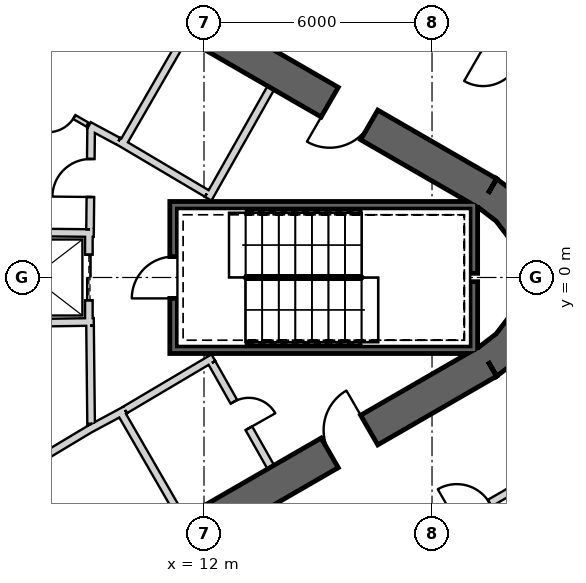
"""IFC4 building model, lengths in metres.
Left out: names, types, materials, properties, quantities, classifications, styles, units other than length and angle.
Written with IfcOpenShell. Run it as: python <this file> out.ifc"""

import sys

from ifc_helpers import new_model, si_unit, direction, frame, frame_2d, origin, place, context, subcontext, project, spatial, polyline, rectangle, outline, extrude, element, fill, save


model = new_model("IFC4")
c1 = context("Model", 3, precision=1e-05, world=origin(), true_north=direction((0.0, 1.0)))
c2 = subcontext(c1, "Body", "Model", "MODEL_VIEW")
j1 = project(units=[si_unit("LENGTHUNIT", "METRE"), si_unit("PLANEANGLEUNIT", "RADIAN")], contexts=[c1])
p1 = place(None, origin())
s1 = spatial("IfcSite", under=j1, at=p1, CompositionType="ELEMENT")
p2 = place(p1, origin())
s2 = spatial("IfcBuilding", under=s1, at=p2, CompositionType="ELEMENT")
p3 = place(p2, frame((0.0, 0.0, 292.7)))
s3 = spatial("IfcBuildingStorey", under=s2, at=p3, CompositionType="ELEMENT", Elevation=292.7)
p4 = place(p3, frame((19.475, 2.208, 0.0), z_axis=(0.0, 0.0, 1.0), x_axis=(-0.866028369851, 0.499994862586, 0.0)))
e1 = element("IfcWall", 1, at=p4, inside=s3, PredefinedType="SHEAR", context=c2, shape_type="SweptSolid", body=[
    extrude(rectangle(XDim=31.523, YDim=0.9, at=frame_2d((15.762, 0.0))), origin(), (0.0, 0.0, 1.0), 6.0),
])
p5 = place(p4, frame((3.612, 0.0, 0.0)))
e2 = element("IfcOpeningElement", 2, at=p5, cuts=e1, PredefinedType="OPENING", context=c2, shape_type="SweptSolid", body=[
    extrude(rectangle(XDim=1.2, YDim=2.4, at=frame_2d((0.6, 1.2))), frame((0.0, 0.46, 0.0), z_axis=(0.0, -1.0, 0.0), x_axis=(1.0, 0.0, 0.0)), (0.0, 0.0, 1.0), 0.92),
])
p6 = place(p4, frame((26.712, 0.0, 0.0)))
e3 = element("IfcOpeningElement", 3, at=p6, cuts=e1, PredefinedType="OPENING", context=c2, shape_type="SweptSolid", body=[
    extrude(rectangle(XDim=1.2, YDim=2.4, at=frame_2d((0.6, 1.2))), frame((0.0, 0.46, 0.0), z_axis=(0.0, -1.0, 0.0), x_axis=(1.0, 0.0, 0.0)), (0.0, 0.0, 1.0), 0.92),
])
p7 = place(p3, frame((-7.825, -17.97, 0.0), z_axis=(0.0, 0.0, 1.0), x_axis=(0.866028369851, 0.499994862586, 0.0)))
e4 = element("IfcWall", 4, at=p7, inside=s3, PredefinedType="SHEAR", context=c2, shape_type="SweptSolid", body=[
    extrude(rectangle(XDim=31.523, YDim=0.9, at=frame_2d((15.762, 0.0))), origin(), (0.0, 0.0, 1.0), 6.0),
])
p8 = place(p7, frame((26.712, 0.0, 0.0)))
e5 = element("IfcOpeningElement", 5, at=p8, cuts=e4, PredefinedType="OPENING", context=c2, shape_type="SweptSolid", body=[
    extrude(rectangle(XDim=1.2, YDim=2.4, at=frame_2d((0.6, 1.2))), frame((0.0, 0.46, 0.0), z_axis=(0.0, -1.0, 0.0), x_axis=(1.0, 0.0, 0.0)), (0.0, 0.0, 1.0), 0.92),
])
p9 = place(p7, frame((3.612, 0.0, 0.0)))
e6 = element("IfcOpeningElement", 6, at=p9, cuts=e4, PredefinedType="OPENING", context=c2, shape_type="SweptSolid", body=[
    extrude(rectangle(XDim=1.2, YDim=2.4, at=frame_2d((0.6, 1.2))), frame((0.0, 0.46, 0.0), z_axis=(0.0, -1.0, 0.0), x_axis=(1.0, 0.0, 0.0)), (0.0, 0.0, 1.0), 0.92),
])
p10 = place(p3, origin())
e7 = element("IfcWall", 7, at=p10, inside=s3, PredefinedType="SHEAR", context=c2, shape_type="SweptSolid", body=[
    extrude(outline(polyline([(19.7, -2.598), (20.321, -2.121), (20.798, -1.5), (21.098, -0.777), (21.2, 0.0), (21.098, 0.777), (20.798, 1.5), (20.321, 2.121), (19.7, 2.598), (19.25, 1.819), (19.685, 1.485), (20.019, 1.05), (20.229, 0.543), (20.3, 0.0), (20.229, -0.543), (20.019, -1.05), (19.685, -1.485), (19.25, -1.819), (19.7, -2.598)])), origin(), (0.0, 0.0, 1.0), 6.0),
])
p11 = place(p3, frame((9.847, 3.495, 0.0), z_axis=(0.0, 0.0, 1.0), x_axis=(0.499984717929, 0.866034226713, 0.0)))
e8 = element("IfcWall", 8, at=p11, inside=s3, PredefinedType="PLUMBINGWALL", context=c2, shape_type="SweptSolid", body=[
    extrude(rectangle(XDim=3.25, YDim=0.2, at=frame_2d((1.625, 0.0))), origin(), (0.0, 0.0, 1.0), 5.7),
])
p12 = place(p3, frame((12.11, 2.073, 0.0), z_axis=(0.0, 0.0, 1.0), x_axis=(0.49196600604, 0.870614408852, 0.0)))
e9 = element("IfcWall", 9, at=p12, inside=s3, PredefinedType="PLUMBINGWALL", context=c2, shape_type="SweptSolid", body=[
    extrude(rectangle(XDim=3.35, YDim=0.2, at=frame_2d((1.675, 0.0))), origin(), (0.0, 0.0, 1.0), 5.7),
])
p13 = place(p3, frame((12.073, 2.211, 0.0), z_axis=(0.0, 0.0, 1.0), x_axis=(-0.860414880418, 0.509594185166, 0.0)))
e10 = element("IfcWall", 10, at=p13, inside=s3, PredefinedType="PLUMBINGWALL", context=c2, shape_type="SweptSolid", body=[
    extrude(rectangle(XDim=2.7, YDim=0.2, at=frame_2d((1.35, 0.0))), origin(), (0.0, 0.0, 1.0), 5.7),
])
p14 = place(p3, frame((9.795, -3.525, 0.0), z_axis=(0.0, 0.0, 1.0), x_axis=(0.499984717929, -0.866034226713, 0.0)))
e11 = element("IfcWall", 11, at=p14, inside=s3, PredefinedType="PLUMBINGWALL", context=c2, shape_type="SweptSolid", body=[
    extrude(rectangle(XDim=3.25, YDim=0.2, at=frame_2d((1.625, 0.0))), origin(), (0.0, 0.0, 1.0), 5.7),
])
p15 = place(p3, frame((8.974, -3.999, 0.0), z_axis=(0.0, 0.0, 1.0), x_axis=(0.880907015104, 0.473289373154, 0.0)))
e12 = element("IfcWall", 12, at=p15, inside=s3, PredefinedType="PLUMBINGWALL", context=c2, shape_type="SweptSolid", body=[
    extrude(rectangle(XDim=1.078, YDim=0.2, at=frame_2d((0.539, 0.0))), origin(), (0.0, 0.0, 1.0), 5.7),
])
p16 = place(p3, frame((7.497, -4.886, 0.0), z_axis=(0.0, 0.0, 1.0), x_axis=(0.857516281273, 0.51445682749, 0.0)))
e13 = element("IfcWall", 13, at=p16, inside=s3, PredefinedType="PLUMBINGWALL", context=c2, shape_type="SweptSolid", body=[
    extrude(rectangle(XDim=1.845, YDim=0.2, at=frame_2d((0.922, 0.0))), origin(), (0.0, 0.0, 1.0), 5.7),
])
p17 = place(p3, frame((19.2, 1.9, -0.35), z_axis=(0.0, 0.0, 1.0), x_axis=(-1.0, 0.0, 0.0)))
e14 = element("IfcWall", 14, at=p17, inside=s3, PredefinedType="SHEAR", context=c2, shape_type="SweptSolid", body=[
    extrude(rectangle(XDim=8.1, YDim=0.2, at=frame_2d((4.05, 0.0))), origin(), (0.0, 0.0, 1.0), 6.05),
])
p18 = place(p3, frame((19.1, -2.0, -0.35), z_axis=(0.0, 0.0, 1.0), x_axis=(0.0, 1.0, 0.0)))
e15 = element("IfcWall", 15, at=p18, inside=s3, PredefinedType="SHEAR", context=c2, shape_type="SweptSolid", body=[
    extrude(rectangle(XDim=1.89, YDim=0.2, at=frame_2d((0.945, 0.0))), origin(), (0.0, 0.0, 1.0), 6.05),
])
p19 = place(p3, frame((19.1, 0.11, -0.35), z_axis=(0.0, 0.0, 1.0), x_axis=(0.0, 1.0, 0.0)))
e16 = element("IfcWall", 16, at=p19, inside=s3, PredefinedType="SHEAR", context=c2, shape_type="SweptSolid", body=[
    extrude(rectangle(XDim=1.69, YDim=0.2, at=frame_2d((0.845, 0.0))), origin(), (0.0, 0.0, 1.0), 6.05),
])
p20 = place(p3, frame((11.1, -1.9, -0.35), z_axis=(0.0, 0.0, 1.0), x_axis=(1.0, 0.0, 0.0)))
e17 = element("IfcWall", 17, at=p20, inside=s3, PredefinedType="SHEAR", context=c2, shape_type="SweptSolid", body=[
    extrude(rectangle(XDim=7.9, YDim=0.2, at=frame_2d((3.95, 0.0))), origin(), (0.0, 0.0, 1.0), 6.05),
])
p21 = place(p3, frame((11.2, -1.8, -0.35), z_axis=(0.0, 0.0, 1.0), x_axis=(0.0, 1.0, 0.0)))
e18 = element("IfcWall", 18, at=p21, inside=s3, PredefinedType="SHEAR", context=c2, shape_type="SweptSolid", body=[
    extrude(rectangle(XDim=3.6, YDim=0.2, at=frame_2d((1.8, 0.0))), origin(), (0.0, 0.0, 1.0), 6.05),
])
p22 = place(p21, frame((1.25, 0.0, 0.35)))
e19 = element("IfcOpeningElement", 19, at=p22, cuts=e18, PredefinedType="OPENING", context=c2, shape_type="SweptSolid", body=[
    extrude(rectangle(XDim=1.1, YDim=2.1, at=frame_2d((0.55, 1.05))), frame((0.0, 0.11, 0.0), z_axis=(0.0, -1.0, 0.0), x_axis=(1.0, 0.0, 0.0)), (0.0, 0.0, 1.0), 0.22),
])
p23 = place(p3, frame((8.97, 1.2, 0.0), z_axis=(0.0, 0.0, 1.0), x_axis=(0.0, -1.0, 0.0)))
e20 = element("IfcWall", 20, at=p23, inside=s3, PredefinedType="PLUMBINGWALL", context=c2, shape_type="SweptSolid", body=[
    extrude(rectangle(XDim=2.4, YDim=0.2, at=frame_2d((1.2, 0.0))), origin(), (0.0, 0.0, 1.0), 5.7),
])
p24 = place(p23, frame((0.6, 0.0, 0.0)))
e21 = element("IfcOpeningElement", 21, at=p24, cuts=e20, PredefinedType="OPENING", context=c2, shape_type="SweptSolid", body=[
    extrude(rectangle(XDim=1.2, YDim=2.4, at=frame_2d((0.6, 1.2))), frame((0.0, 0.11, 0.0), z_axis=(0.0, -1.0, 0.0), x_axis=(1.0, 0.0, 0.0)), (0.0, 0.0, 1.0), 0.22),
])
p25 = place(p3, frame((9.1, -1.168, 0.0), z_axis=(0.0, 0.0, 1.0), x_axis=(-0.999896137355, -0.014412303875, 0.0)))
e22 = element("IfcWall", 22, at=p25, inside=s3, PredefinedType="PLUMBINGWALL", context=c2, shape_type="SweptSolid", body=[
    extrude(rectangle(XDim=2.151, YDim=0.2, at=frame_2d((1.076, 0.0))), origin(), (0.0, 0.0, 1.0), 5.7),
])
p26 = place(p3, frame((9.1, 1.169, 0.0), z_axis=(0.0, 0.0, 1.0), x_axis=(-0.99994990606, 0.010009264196, 0.0)))
e23 = element("IfcWall", 23, at=p26, inside=s3, PredefinedType="PLUMBINGWALL", context=c2, shape_type="SweptSolid", body=[
    extrude(rectangle(XDim=3.0, YDim=0.2, at=frame_2d((1.5, 0.0))), origin(), (0.0, 0.0, 1.0), 5.7),
])
p27 = place(p3, frame((8.974, 3.999, 0.0), z_axis=(0.0, 0.0, 1.0), x_axis=(0.880917147855, -0.473270513147, 0.0)))
e24 = element("IfcWall", 24, at=p27, inside=s3, PredefinedType="PARTITIONING", context=c2, shape_type="SweptSolid", body=[
    extrude(rectangle(XDim=0.878, YDim=0.2, at=frame_2d((0.439, 0.0))), origin(), (0.0, 0.0, 1.0), 5.7),
])
p28 = place(p3, frame((7.55, 4.821, 0.0), z_axis=(0.0, 0.0, 1.0), x_axis=(0.866019818373, -0.500009674092, 0.0)))
e25 = element("IfcWall", 25, at=p28, inside=s3, PredefinedType="PARTITIONING", context=c2, shape_type="SweptSolid", body=[
    extrude(rectangle(XDim=1.594, YDim=0.12, at=frame_2d((0.797, 0.0))), origin(), (0.0, 0.0, 1.0), 5.7),
])
p29 = place(p28, frame((0.397, 0.0, 0.0)))
e26 = element("IfcOpeningElement", 26, at=p29, cuts=e25, PredefinedType="OPENING", context=c2, shape_type="SweptSolid", body=[
    extrude(rectangle(XDim=0.8, YDim=2.1, at=frame_2d((0.4, 1.05))), frame((0.0, 0.07, 0.0), z_axis=(0.0, -1.0, 0.0), x_axis=(1.0, 0.0, 0.0)), (0.0, 0.0, 1.0), 0.14),
])
p30 = place(p3, frame((12.245, -2.109, 0.0), z_axis=(0.0, 0.0, 1.0), x_axis=(-0.860414880418, -0.509594185166, 0.0)))
e27 = element("IfcWall", 27, at=p30, inside=s3, PredefinedType="PARTITIONING", context=c2, shape_type="SweptSolid", body=[
    extrude(rectangle(XDim=2.7, YDim=0.2, at=frame_2d((1.35, 0.0))), origin(), (0.0, 0.0, 1.0), 5.7),
])
p31 = place(p3, frame((13.758, -4.99, 0.0), z_axis=(0.0, 0.0, 1.0), x_axis=(-0.491993409184, 0.87059892334, 0.0)))
e28 = element("IfcWall", 28, at=p31, inside=s3, PredefinedType="PARTITIONING", context=c2, shape_type="SweptSolid", body=[
    extrude(rectangle(XDim=3.15, YDim=0.2, at=frame_2d((1.575, 0.0))), origin(), (0.0, 0.0, 1.0), 5.7),
])
p32 = place(p31, frame((1.175, 0.0, 0.0)))
e29 = element("IfcOpeningElement", 29, at=p32, cuts=e28, PredefinedType="OPENING", context=c2, shape_type="SweptSolid", body=[
    extrude(rectangle(XDim=0.8, YDim=2.1, at=frame_2d((0.4, 1.05))), frame((0.0, 0.11, 0.0), z_axis=(0.0, -1.0, 0.0), x_axis=(1.0, 0.0, 0.0)), (0.0, 0.0, 1.0), 0.22),
])
p33 = place(p3, frame((9.029, -3.851, 0.0), z_axis=(0.0, 0.0, 1.0), x_axis=(-0.010784614026, 0.999941844359, 0.0)))
e30 = element("IfcWall", 30, at=p33, inside=s3, PredefinedType="PARTITIONING", context=c2, shape_type="SweptSolid", body=[
    extrude(rectangle(XDim=2.581, YDim=0.2, at=frame_2d((1.291, 0.0))), origin(), (0.0, 0.0, 1.0), 5.7),
])
p34 = place(p3, frame((9.001, 1.27, 0.0), z_axis=(0.0, 0.0, 1.0), x_axis=(0.010723968736, 0.999942496594, 0.0)))
e31 = element("IfcWall", 31, at=p34, inside=s3, PredefinedType="PARTITIONING", context=c2, shape_type="SweptSolid", body=[
    extrude(rectangle(XDim=2.709, YDim=0.2, at=frame_2d((1.354, 0.0))), origin(), (0.0, 0.0, 1.0), 5.7),
])
p35 = place(p34, frame((0.848, 0.0, 0.0)))
e32 = element("IfcOpeningElement", 32, at=p35, cuts=e31, PredefinedType="OPENING", context=c2, shape_type="SweptSolid", body=[
    extrude(rectangle(XDim=1.0, YDim=2.1, at=frame_2d((0.5, 1.05))), frame((0.0, 0.11, 0.0), z_axis=(0.0, -1.0, 0.0), x_axis=(1.0, 0.0, 0.0)), (0.0, 0.0, 1.0), 0.22),
])
p36 = place(p3, frame((21.596, 4.736, 0.0), z_axis=(0.0, 0.0, 1.0), x_axis=(-0.86599454633, 0.50005344287, 0.0)))
e33 = element("IfcWall", 33, at=p36, inside=s3, PredefinedType="PARTITIONING", context=c2, shape_type="SweptSolid", body=[
    extrude(rectangle(XDim=4.065, YDim=0.2, at=frame_2d((2.032, 0.0))), origin(), (0.0, 0.0, 1.0), 4.98),
])
p37 = place(p36, frame((1.6, 0.0, 0.0)))
e34 = element("IfcOpeningElement", 34, at=p37, cuts=e33, PredefinedType="OPENING", context=c2, shape_type="SweptSolid", body=[
    extrude(rectangle(XDim=1.0, YDim=2.1, at=frame_2d((0.5, 1.05))), frame((0.0, 0.11, 0.0), z_axis=(0.0, -1.0, 0.0), x_axis=(1.0, 0.0, 0.0)), (0.0, 0.0, 1.0), 0.22),
])
p38 = place(p3, frame((16.876, -7.462, 0.0), z_axis=(0.0, 0.0, 1.0), x_axis=(0.866025553686, 0.499999740363, 0.0)))
e35 = element("IfcWall", 35, at=p38, inside=s3, PredefinedType="PARTITIONING", context=c2, shape_type="SweptSolid", body=[
    extrude(rectangle(XDim=5.183, YDim=0.2, at=frame_2d((2.591, 0.0))), origin(), (0.0, 0.0, 1.0), 4.98),
])
p39 = place(p38, frame((2.05, 0.0, 0.0)))
e36 = element("IfcOpeningElement", 36, at=p39, cuts=e35, PredefinedType="OPENING", context=c2, shape_type="SweptSolid", body=[
    extrude(rectangle(XDim=1.0, YDim=2.1, at=frame_2d((0.5, 1.05))), frame((0.0, 0.11, 0.0), z_axis=(0.0, -1.0, 0.0), x_axis=(1.0, 0.0, 0.0)), (0.0, 0.0, 1.0), 0.22),
])
p40 = place(p22, origin())
e37 = element("IfcDoor", 37, at=p40, inside=s3, OperationType="SINGLE_SWING_LEFT", PredefinedType="USERDEFINED", context=c2, shape_type="SweptSolid", body=[
    extrude(rectangle(XDim=1.1, YDim=2.1, at=frame_2d((0.55, 1.05))), frame((0.0, 0.025, 0.0), z_axis=(0.0, -1.0, 0.0), x_axis=(1.0, 0.0, 0.0)), (0.0, 0.0, 1.0), 0.05),
])
fill(e19, e37)
p41 = place(p35, origin())
e38 = element("IfcDoor", 38, at=p41, inside=s3, OperationType="SINGLE_SWING_LEFT", PredefinedType="USERDEFINED", context=c2, shape_type="SweptSolid", body=[
    extrude(rectangle(XDim=1.0, YDim=2.1, at=frame_2d((0.5, 1.05))), frame((0.0, 0.025, 0.0), z_axis=(0.0, -1.0, 0.0), x_axis=(1.0, 0.0, 0.0)), (0.0, 0.0, 1.0), 0.05),
])
fill(e32, e38)
p42 = place(p24, origin())
e39 = element("IfcDoor", 39, at=p42, inside=s3, OperationType="SLIDING_TO_LEFT", PredefinedType="USERDEFINED", context=c2, shape_type="SweptSolid", body=[
    extrude(rectangle(XDim=1.2, YDim=2.4, at=frame_2d((0.6, 1.2))), frame((0.0, 0.025, 0.0), z_axis=(0.0, -1.0, 0.0), x_axis=(1.0, 0.0, 0.0)), (0.0, 0.0, 1.0), 0.05),
])
fill(e21, e39)
p43 = place(p29, origin())
e40 = element("IfcDoor", 40, at=p43, inside=s3, OperationType="SINGLE_SWING_LEFT", PredefinedType="USERDEFINED", context=c2, shape_type="SweptSolid", body=[
    extrude(rectangle(XDim=0.8, YDim=2.1, at=frame_2d((0.4, 1.05))), frame((0.0, 0.025, 0.0), z_axis=(0.0, -1.0, 0.0), x_axis=(1.0, 0.0, 0.0)), (0.0, 0.0, 1.0), 0.05),
])
fill(e26, e40)
p44 = place(p32, origin())
e41 = element("IfcDoor", 41, at=p44, inside=s3, OperationType="SINGLE_SWING_LEFT", PredefinedType="USERDEFINED", context=c2, shape_type="SweptSolid", body=[
    extrude(rectangle(XDim=0.8, YDim=2.1, at=frame_2d((0.4, 1.05))), frame((0.0, 0.025, 0.0), z_axis=(0.0, -1.0, 0.0), x_axis=(1.0, 0.0, 0.0)), (0.0, 0.0, 1.0), 0.05),
])
fill(e29, e41)
p45 = place(p37, origin())
e42 = element("IfcDoor", 42, at=p45, inside=s3, OperationType="SINGLE_SWING_RIGHT", PredefinedType="USERDEFINED", context=c2, shape_type="SweptSolid", body=[
    extrude(rectangle(XDim=1.0, YDim=2.1, at=frame_2d((0.5, 1.05))), frame((0.0, 0.025, 0.0), z_axis=(0.0, -1.0, 0.0), x_axis=(1.0, 0.0, 0.0)), (0.0, 0.0, 1.0), 0.05),
])
fill(e34, e42)
p46 = place(p39, origin())
e43 = element("IfcDoor", 43, at=p46, inside=s3, OperationType="SINGLE_SWING_LEFT", PredefinedType="USERDEFINED", context=c2, shape_type="SweptSolid", body=[
    extrude(rectangle(XDim=1.0, YDim=2.1, at=frame_2d((0.5, 1.05))), frame((0.0, 0.025, 0.0), z_axis=(0.0, -1.0, 0.0), x_axis=(1.0, 0.0, 0.0)), (0.0, 0.0, 1.0), 0.05),
])
fill(e36, e43)
p47 = place(p8, origin())
e44 = element("IfcDoor", 44, at=p47, inside=s3, OperationType="SINGLE_SWING_RIGHT", PredefinedType="USERDEFINED", context=c2, shape_type="SweptSolid", body=[
    extrude(rectangle(XDim=1.2, YDim=2.4, at=frame_2d((0.6, 1.2))), frame((0.0, 0.025, 0.0), z_axis=(0.0, -1.0, 0.0), x_axis=(1.0, 0.0, 0.0)), (0.0, 0.0, 1.0), 0.05),
])
fill(e5, e44)
p48 = place(p5, origin())
e45 = element("IfcDoor", 45, at=p48, inside=s3, OperationType="SINGLE_SWING_RIGHT", PredefinedType="USERDEFINED", context=c2, shape_type="SweptSolid", body=[
    extrude(rectangle(XDim=1.2, YDim=2.4, at=frame_2d((0.6, 1.2))), frame((0.0, 0.025, 0.0), z_axis=(0.0, -1.0, 0.0), x_axis=(1.0, 0.0, 0.0)), (0.0, 0.0, 1.0), 0.05),
])
fill(e2, e45)
save(model, sys.argv[1])
